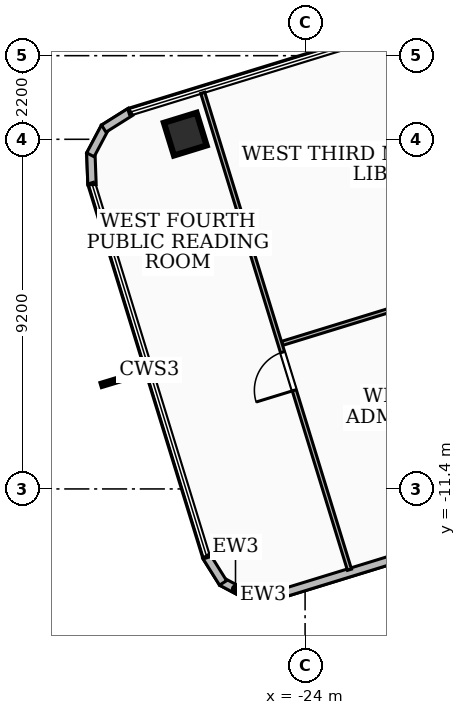
"""IFC4 building model, lengths in metres.
Left out: names, types, materials, properties, quantities, classifications, styles, units other than length and angle.
Written with IfcOpenShell. Run it as: python <this file> out.ifc"""

import sys

from ifc_helpers import new_model, si_unit, direction, frame, frame_2d, origin, origin_2d, place, context, subcontext, project, spatial, rectangle, extrude, element, fill, save


model = new_model("IFC4")
c1 = context("Model", 3, precision=1e-05, world=origin(), true_north=direction((0.0, 1.0)))
c2 = subcontext(c1, "Body", "Model", "MODEL_VIEW")
j1 = project(units=[si_unit("LENGTHUNIT", "METRE"), si_unit("PLANEANGLEUNIT", "RADIAN")], contexts=[c1])
p1 = place(None, origin())
s1 = spatial("IfcSite", under=j1, at=p1, CompositionType="ELEMENT")
p2 = place(p1, origin())
s2 = spatial("IfcBuilding", under=s1, at=p2, CompositionType="ELEMENT")
p3 = place(p2, frame((0.0, 0.0, 148.68)))
s3 = spatial("IfcBuildingStorey", under=s2, at=p3, CompositionType="ELEMENT", Elevation=148.68)
p4 = place(p3, frame((-27.153, -2.064, 0.0), z_axis=(0.0, 0.0, 1.0), x_axis=(0.955793014798, 0.294040325232, 0.0)))
e1 = element("IfcColumn", 1, at=p4, inside=s3, PredefinedType="COLUMN", context=c2, shape_type="SweptSolid", body=[
    extrude(rectangle(XDim=0.9, YDim=0.9, at=origin_2d()), origin(), (0.0, 0.0, 1.0), 3.6),
])
p5 = place(p3, frame((-11.868, -10.232, 0.0), z_axis=(0.0, 0.0, 1.0), x_axis=(-0.955802538335, -0.29400936671, 0.0)))
e2 = element("IfcWall", 2, at=p5, inside=s3, PredefinedType="SOLIDWALL", context=c2, shape_type="SweptSolid", body=[
    extrude(rectangle(XDim=13.459, YDim=0.22, at=frame_2d((6.729, 0.0))), origin(), (0.0, 0.0, 1.0), 3.32),
])
p6 = place(p5, frame((2.85, 0.0, 0.85)))
e3 = element("IfcOpeningElement", 3, at=p6, cuts=e2, PredefinedType="OPENING", context=c2, shape_type="SweptSolid", body=[
    extrude(rectangle(XDim=1.5, YDim=1.8, at=frame_2d((0.75, 0.9))), frame((0.0, 0.12, 0.0), z_axis=(0.0, -1.0, 0.0), x_axis=(1.0, 0.0, 0.0)), (0.0, 0.0, 1.0), 0.24),
])
p7 = place(p3, frame((-24.683, -14.181, 0.0), z_axis=(0.0, 0.0, 1.0), x_axis=(-0.999307996296, -0.037195813461, 0.0)))
e4 = element("IfcWall", 4, at=p7, inside=s3, PredefinedType="SOLIDWALL", context=c2, shape_type="SweptSolid", body=[
    extrude(rectangle(XDim=0.833, YDim=0.22, at=frame_2d((0.417, 0.0))), origin(), (0.0, 0.0, 1.0), 3.32),
])
p8 = place(p3, frame((-25.469, -14.223, 0.0), z_axis=(0.0, 0.0, 1.0), x_axis=(-0.883570434709, 0.468298288389, 0.0)))
e5 = element("IfcWall", 5, at=p8, inside=s3, PredefinedType="SOLIDWALL", context=c2, shape_type="SweptSolid", body=[
    extrude(rectangle(XDim=0.82, YDim=0.22, at=frame_2d((0.41, 0.0))), origin(), (0.0, 0.0, 1.0), 3.32),
])
p9 = place(p3, frame((-26.158, -13.872, 0.0), z_axis=(0.0, 0.0, 1.0), x_axis=(-0.531050540535, 0.847340146221, 0.0)))
e6 = element("IfcWall", 6, at=p9, inside=s3, PredefinedType="SOLIDWALL", context=c2, shape_type="SweptSolid", body=[
    extrude(rectangle(XDim=0.834, YDim=0.22, at=frame_2d((0.417, 0.0))), origin(), (0.0, 0.0, 1.0), 3.32),
])
p10 = place(p3, frame((-29.607, -3.394, 0.0), z_axis=(0.0, 0.0, 1.0), x_axis=(-0.037195813461, 0.999307996296, 0.0)))
e7 = element("IfcWall", 7, at=p10, inside=s3, PredefinedType="SOLIDWALL", context=c2, shape_type="SweptSolid", body=[
    extrude(rectangle(XDim=0.833, YDim=0.22, at=frame_2d((0.417, 0.0))), origin(), (0.0, 0.0, 1.0), 3.32),
])
p11 = place(p3, frame((-29.649, -2.608, 0.0), z_axis=(0.0, 0.0, 1.0), x_axis=(0.468654126993, 0.883381746049, 0.0)))
e8 = element("IfcWall", 8, at=p11, inside=s3, PredefinedType="SOLIDWALL", context=c2, shape_type="SweptSolid", body=[
    extrude(rectangle(XDim=0.819, YDim=0.22, at=frame_2d((0.41, 0.0))), origin(), (0.0, 0.0, 1.0), 3.32),
])
p12 = place(p3, frame((-29.298, -1.919, 0.0), z_axis=(0.0, 0.0, 1.0), x_axis=(0.847141460322, 0.531367430506, 0.0)))
e9 = element("IfcWall", 9, at=p12, inside=s3, PredefinedType="SOLIDWALL", context=c2, shape_type="SweptSolid", body=[
    extrude(rectangle(XDim=0.833, YDim=0.22, at=frame_2d((0.417, 0.0))), origin(), (0.0, 0.0, 1.0), 3.32),
])
p13 = place(p3, frame((-15.904, -4.893, 0.0), z_axis=(0.0, 0.0, 1.0), x_axis=(-0.955787709154, -0.294057570944, 0.0)))
e10 = element("IfcWall", 10, at=p13, inside=s3, PredefinedType="PARTITIONING", context=c2, shape_type="SweptSolid", body=[
    extrude(rectangle(XDim=9.1, YDim=0.11, at=frame_2d((4.55, 0.0))), origin(), (0.0, 0.0, 1.0), 2.812),
])
p14 = place(p3, frame((-22.832, -13.526, 0.0), z_axis=(0.0, 0.0, 1.0), x_axis=(-0.294079315466, 0.955781018966, 0.0)))
e11 = element("IfcWall", 11, at=p14, inside=s3, PredefinedType="PARTITIONING", context=c2, shape_type="SweptSolid", body=[
    extrude(rectangle(XDim=13.129, YDim=0.11, at=frame_2d((6.565, 0.0))), origin(), (0.0, 0.0, 1.0), 2.55),
])
p15 = place(p14, frame((4.94, 0.0, 0.0)))
e12 = element("IfcOpeningElement", 12, at=p15, cuts=e11, PredefinedType="OPENING", context=c2, shape_type="SweptSolid", body=[
    extrude(rectangle(XDim=1.05, YDim=2.08, at=frame_2d((0.525, 1.04))), frame((0.0, 0.065, 0.0), z_axis=(0.0, -1.0, 0.0), x_axis=(1.0, 0.0, 0.0)), (0.0, 0.0, 1.0), 0.13),
])
p16 = place(p15, origin())
e13 = element("IfcDoor", 13, at=p16, inside=s3, OperationType="SINGLE_SWING_LEFT", PredefinedType="DOOR", context=c2, shape_type="SweptSolid", body=[
    extrude(rectangle(XDim=1.05, YDim=2.08, at=frame_2d((0.525, 1.04))), frame((0.0, 0.025, 0.0), z_axis=(0.0, -1.0, 0.0), x_axis=(1.0, 0.0, 0.0)), (0.0, 0.0, 1.0), 0.05),
])
fill(e12, e13)
save(model, sys.argv[1])
